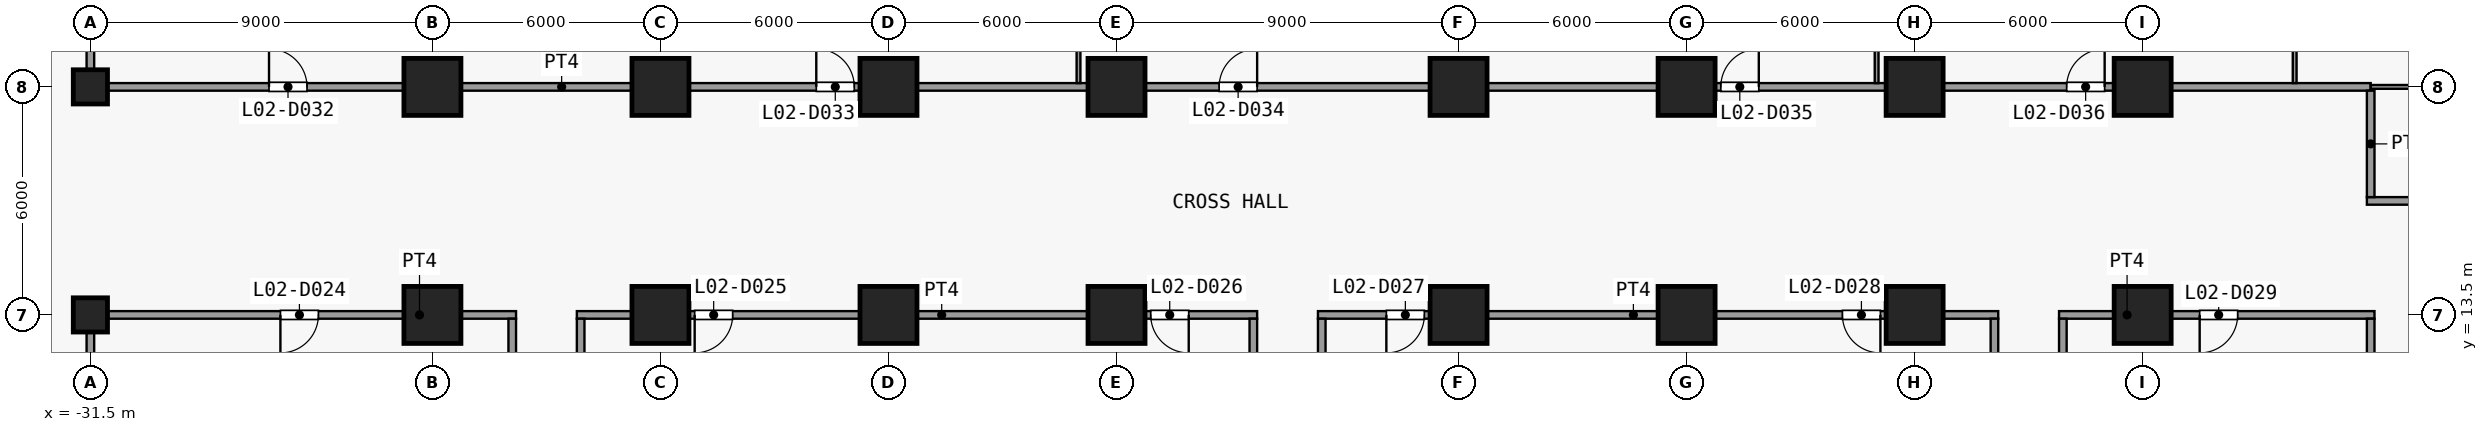
"""IFC4 building model, lengths in metres.
Left out: names, types, materials, properties, quantities, classifications, styles, units other than length and angle.
Written with IfcOpenShell. Run it as: python <this file> out.ifc"""

import sys

from ifc_helpers import new_model, si_unit, direction, frame, frame_2d, origin, origin_2d, place, context, subcontext, project, spatial, rectangle, extrude, element, fill, save


model = new_model("IFC4")
c1 = context("Model", 3, precision=1e-05, world=origin(), true_north=direction((0.0, 1.0)))
c2 = subcontext(c1, "Body", "Model", "MODEL_VIEW")
j1 = project(units=[si_unit("LENGTHUNIT", "METRE"), si_unit("PLANEANGLEUNIT", "RADIAN")], contexts=[c1])
p1 = place(None, origin())
s1 = spatial("IfcSite", under=j1, at=p1, CompositionType="ELEMENT")
p2 = place(p1, origin())
s2 = spatial("IfcBuilding", under=s1, at=p2, CompositionType="ELEMENT")
p3 = place(p2, frame((0.0, 0.0, 13.5)))
s3 = spatial("IfcBuildingStorey", under=s2, at=p3, CompositionType="ELEMENT", Elevation=13.5)
for number, where, z_axis, x_axis in (
    (1, (-31.5, 13.5, 0.0), (0.0, 0.0, 1.0), (1.0, 0.0, 0.0)),
    (2, (-31.5, 19.5, 0.0), (0.0, 0.0, 1.0), (1.0, 0.0, 0.0)),
):
    element("IfcColumn", number, at=place(p3, frame(where, z_axis=z_axis, x_axis=x_axis)), inside=s3, PredefinedType="COLUMN", context=c2, shape_type="SweptSolid", body=[
        extrude(rectangle(XDim=0.9, YDim=0.9, at=origin_2d()), origin(), (0.0, 0.0, 1.0), 5.0),
    ])
for number, where, z_axis, x_axis in (
    (3, (-22.5, 13.5, 0.0), (0.0, 0.0, 1.0), (1.0, 0.0, 0.0)),
    (4, (-22.5, 19.5, 0.0), (0.0, 0.0, 1.0), (1.0, 0.0, 0.0)),
    (5, (-16.5, 13.5, 0.0), (0.0, 0.0, 1.0), (1.0, 0.0, 0.0)),
    (6, (-16.5, 19.5, 0.0), (0.0, 0.0, 1.0), (1.0, 0.0, 0.0)),
    (7, (-10.5, 13.5, 0.0), (0.0, 0.0, 1.0), (1.0, 0.0, 0.0)),
    (8, (-10.5, 19.5, 0.0), (0.0, 0.0, 1.0), (1.0, 0.0, 0.0)),
    (9, (-4.5, 13.5, 0.0), (0.0, 0.0, 1.0), (1.0, 0.0, 0.0)),
    (10, (-4.5, 19.5, 0.0), (0.0, 0.0, 1.0), (1.0, 0.0, 0.0)),
    (11, (4.5, 13.5, 0.0), (0.0, 0.0, 1.0), (1.0, 0.0, 0.0)),
    (12, (4.5, 19.5, 0.0), (0.0, 0.0, 1.0), (1.0, 0.0, 0.0)),
    (13, (10.5, 13.5, 0.0), (0.0, 0.0, 1.0), (1.0, 0.0, 0.0)),
    (14, (10.5, 19.5, 0.0), (0.0, 0.0, 1.0), (1.0, 0.0, 0.0)),
    (15, (16.5, 13.5, 0.0), (0.0, 0.0, 1.0), (1.0, 0.0, 0.0)),
    (16, (16.5, 19.5, 0.0), (0.0, 0.0, 1.0), (1.0, 0.0, 0.0)),
    (17, (22.5, 13.5, 0.0), (0.0, 0.0, 1.0), (1.0, 0.0, 0.0)),
    (18, (22.5, 19.5, 0.0), (0.0, 0.0, 1.0), (1.0, 0.0, 0.0)),
):
    element("IfcColumn", number, at=place(p3, frame(where, z_axis=z_axis, x_axis=x_axis)), inside=s3, PredefinedType="COLUMN", context=c2, shape_type="SweptSolid", body=[
        extrude(rectangle(XDim=1.5, YDim=1.5, at=origin_2d()), origin(), (0.0, 0.0, 1.0), 5.0),
    ])
p4 = place(p3, frame((-31.6, 13.5, 0.0), z_axis=(0.0, 0.0, 1.0), x_axis=(1.0, 0.0, 0.0)))
e19 = element("IfcWall", 19, at=p4, inside=s3, PredefinedType="PARTITIONING", context=c2, shape_type="SweptSolid", body=[
    extrude(rectangle(XDim=11.3, YDim=0.2, at=frame_2d((5.65, 0.0))), origin(), (0.0, 0.0, 1.0), 4.65),
])
p5 = place(p4, frame((5.1, 0.0, 0.0)))
e20 = element("IfcOpeningElement", 20, at=p5, cuts=e19, PredefinedType="OPENING", context=c2, shape_type="SweptSolid", body=[
    extrude(rectangle(XDim=1.0, YDim=2.1, at=frame_2d((0.5, 1.05))), frame((0.0, 0.11, 0.0), z_axis=(0.0, -1.0, 0.0), x_axis=(1.0, 0.0, 0.0)), (0.0, 0.0, 1.0), 0.22),
])
p6 = place(p3, frame((-18.7, 13.5, 0.0), z_axis=(0.0, 0.0, 1.0), x_axis=(1.0, 0.0, 0.0)))
e21 = element("IfcWall", 21, at=p6, inside=s3, PredefinedType="PARTITIONING", context=c2, shape_type="SweptSolid", body=[
    extrude(rectangle(XDim=17.9, YDim=0.2, at=frame_2d((8.95, 0.0))), origin(), (0.0, 0.0, 1.0), 4.65),
])
p7 = place(p6, frame((3.1, 0.0, 0.0)))
e22 = element("IfcOpeningElement", 22, at=p7, cuts=e21, PredefinedType="OPENING", context=c2, shape_type="SweptSolid", body=[
    extrude(rectangle(XDim=1.0, YDim=2.1, at=frame_2d((0.5, 1.05))), frame((0.0, 0.11, 0.0), z_axis=(0.0, -1.0, 0.0), x_axis=(1.0, 0.0, 0.0)), (0.0, 0.0, 1.0), 0.22),
])
p8 = place(p6, frame((15.1, 0.0, 0.0)))
e23 = element("IfcOpeningElement", 23, at=p8, cuts=e21, PredefinedType="OPENING", context=c2, shape_type="SweptSolid", body=[
    extrude(rectangle(XDim=1.0, YDim=2.1, at=frame_2d((0.5, 1.05))), frame((0.0, 0.11, 0.0), z_axis=(0.0, -1.0, 0.0), x_axis=(1.0, 0.0, 0.0)), (0.0, 0.0, 1.0), 0.22),
])
p9 = place(p3, frame((0.8, 13.5, 0.0), z_axis=(0.0, 0.0, 1.0), x_axis=(1.0, 0.0, 0.0)))
e24 = element("IfcWall", 24, at=p9, inside=s3, PredefinedType="PARTITIONING", context=c2, shape_type="SweptSolid", body=[
    extrude(rectangle(XDim=17.9, YDim=0.2, at=frame_2d((8.95, 0.0))), origin(), (0.0, 0.0, 1.0), 4.65),
])
p10 = place(p9, frame((1.8, 0.0, 0.0)))
e25 = element("IfcOpeningElement", 25, at=p10, cuts=e24, PredefinedType="OPENING", context=c2, shape_type="SweptSolid", body=[
    extrude(rectangle(XDim=1.0, YDim=2.1, at=frame_2d((0.5, 1.05))), frame((0.0, 0.11, 0.0), z_axis=(0.0, -1.0, 0.0), x_axis=(1.0, 0.0, 0.0)), (0.0, 0.0, 1.0), 0.22),
])
p11 = place(p9, frame((13.8, 0.0, 0.0)))
e26 = element("IfcOpeningElement", 26, at=p11, cuts=e24, PredefinedType="OPENING", context=c2, shape_type="SweptSolid", body=[
    extrude(rectangle(XDim=1.0, YDim=2.1, at=frame_2d((0.5, 1.05))), frame((0.0, 0.11, 0.0), z_axis=(0.0, -1.0, 0.0), x_axis=(1.0, 0.0, 0.0)), (0.0, 0.0, 1.0), 0.22),
])
p12 = place(p3, frame((20.3, 13.5, 0.0), z_axis=(0.0, 0.0, 1.0), x_axis=(1.0, 0.0, 0.0)))
e27 = element("IfcWall", 27, at=p12, inside=s3, PredefinedType="PARTITIONING", context=c2, shape_type="SweptSolid", body=[
    extrude(rectangle(XDim=8.3, YDim=0.2, at=frame_2d((4.15, 0.0))), origin(), (0.0, 0.0, 1.0), 4.65),
])
p13 = place(p12, frame((3.7, 0.0, 0.0)))
e28 = element("IfcOpeningElement", 28, at=p13, cuts=e27, PredefinedType="OPENING", context=c2, shape_type="SweptSolid", body=[
    extrude(rectangle(XDim=1.0, YDim=2.1, at=frame_2d((0.5, 1.05))), frame((0.0, 0.11, 0.0), z_axis=(0.0, -1.0, 0.0), x_axis=(1.0, 0.0, 0.0)), (0.0, 0.0, 1.0), 0.22),
])
p14 = place(p3, frame((28.4, 16.5, 0.0), z_axis=(0.0, 0.0, 1.0), x_axis=(1.0, 0.0, 0.0)))
e29 = element("IfcWall", 29, at=p14, inside=s3, PredefinedType="PARTITIONING", context=c2, shape_type="SweptSolid", body=[
    extrude(rectangle(XDim=24.2, YDim=0.2, at=frame_2d((12.1, 0.0))), origin(), (0.0, 0.0, 1.0), 4.65),
])
p15 = place(p14, frame((6.2, 0.0, 0.0)))
e30 = element("IfcOpeningElement", 30, at=p15, cuts=e29, PredefinedType="OPENING", context=c2, shape_type="SweptSolid", body=[
    extrude(rectangle(XDim=1.0, YDim=2.1, at=frame_2d((0.5, 1.05))), frame((0.0, 0.11, 0.0), z_axis=(0.0, -1.0, 0.0), x_axis=(1.0, 0.0, 0.0)), (0.0, 0.0, 1.0), 0.22),
])
p16 = place(p14, frame((17.0, 0.0, 0.0)))
e31 = element("IfcOpeningElement", 31, at=p16, cuts=e29, PredefinedType="OPENING", context=c2, shape_type="SweptSolid", body=[
    extrude(rectangle(XDim=1.0, YDim=2.1, at=frame_2d((0.5, 1.05))), frame((0.0, 0.11, 0.0), z_axis=(0.0, -1.0, 0.0), x_axis=(1.0, 0.0, 0.0)), (0.0, 0.0, 1.0), 0.22),
])
p17 = place(p3, frame((-31.6, 19.5, 0.0), z_axis=(0.0, 0.0, 1.0), x_axis=(1.0, 0.0, 0.0)))
e32 = element("IfcWall", 32, at=p17, inside=s3, PredefinedType="PARTITIONING", context=c2, shape_type="SweptSolid", body=[
    extrude(rectangle(XDim=60.1, YDim=0.2, at=frame_2d((30.05, 0.0))), origin(), (0.0, 0.0, 1.0), 4.65),
])
p18 = place(p17, frame((4.8, 0.0, 0.0)))
e33 = element("IfcOpeningElement", 33, at=p18, cuts=e32, PredefinedType="OPENING", context=c2, shape_type="SweptSolid", body=[
    extrude(rectangle(XDim=1.0, YDim=2.1, at=frame_2d((0.5, 1.05))), frame((0.0, 0.11, 0.0), z_axis=(0.0, -1.0, 0.0), x_axis=(1.0, 0.0, 0.0)), (0.0, 0.0, 1.0), 0.22),
])
p19 = place(p17, frame((19.2, 0.0, 0.0)))
e34 = element("IfcOpeningElement", 34, at=p19, cuts=e32, PredefinedType="OPENING", context=c2, shape_type="SweptSolid", body=[
    extrude(rectangle(XDim=1.0, YDim=2.1, at=frame_2d((0.5, 1.05))), frame((0.0, 0.11, 0.0), z_axis=(0.0, -1.0, 0.0), x_axis=(1.0, 0.0, 0.0)), (0.0, 0.0, 1.0), 0.22),
])
p20 = place(p17, frame((29.8, 0.0, 0.0)))
e35 = element("IfcOpeningElement", 35, at=p20, cuts=e32, PredefinedType="OPENING", context=c2, shape_type="SweptSolid", body=[
    extrude(rectangle(XDim=1.0, YDim=2.1, at=frame_2d((0.5, 1.05))), frame((0.0, 0.11, 0.0), z_axis=(0.0, -1.0, 0.0), x_axis=(1.0, 0.0, 0.0)), (0.0, 0.0, 1.0), 0.22),
])
p21 = place(p17, frame((43.0, 0.0, 0.0)))
e36 = element("IfcOpeningElement", 36, at=p21, cuts=e32, PredefinedType="OPENING", context=c2, shape_type="SweptSolid", body=[
    extrude(rectangle(XDim=1.0, YDim=2.1, at=frame_2d((0.5, 1.05))), frame((0.0, 0.11, 0.0), z_axis=(0.0, -1.0, 0.0), x_axis=(1.0, 0.0, 0.0)), (0.0, 0.0, 1.0), 0.22),
])
p22 = place(p17, frame((52.1, 0.0, 0.0)))
e37 = element("IfcOpeningElement", 37, at=p22, cuts=e32, PredefinedType="OPENING", context=c2, shape_type="SweptSolid", body=[
    extrude(rectangle(XDim=1.0, YDim=2.1, at=frame_2d((0.5, 1.05))), frame((0.0, 0.11, 0.0), z_axis=(0.0, -1.0, 0.0), x_axis=(1.0, 0.0, 0.0)), (0.0, 0.0, 1.0), 0.22),
])
p23 = place(p3, frame((28.5, 19.5, 0.0), z_axis=(0.0, 0.0, 1.0), x_axis=(1.0, 0.0, 0.0)))
e38 = element("IfcWall", 38, at=p23, inside=s3, PredefinedType="PARTITIONING", context=c2, shape_type="SweptSolid", body=[
    extrude(rectangle(XDim=23.9, YDim=0.1, at=frame_2d((11.95, 0.0))), origin(), (0.0, 0.0, 1.0), 4.65),
])
p24 = place(p3, frame((-31.5, 1.6, 0.0), z_axis=(0.0, 0.0, 1.0), x_axis=(0.0, 1.0, 0.0)))
e39 = element("IfcWall", 39, at=p24, inside=s3, PredefinedType="PARTITIONING", context=c2, shape_type="SweptSolid", body=[
    extrude(rectangle(XDim=11.8, YDim=0.2, at=frame_2d((5.9, 0.0))), origin(), (0.0, 0.0, 1.0), 4.65),
])
p25 = place(p3, frame((-31.5, 19.6, 0.0), z_axis=(0.0, 0.0, 1.0), x_axis=(0.0, 1.0, 0.0)))
e40 = element("IfcWall", 40, at=p25, inside=s3, PredefinedType="PARTITIONING", context=c2, shape_type="SweptSolid", body=[
    extrude(rectangle(XDim=11.8, YDim=0.2, at=frame_2d((5.9, 0.0))), origin(), (0.0, 0.0, 1.0), 4.65),
])
p26 = place(p25, frame((8.3, 0.0, 0.0)))
e41 = element("IfcOpeningElement", 41, at=p26, cuts=e40, PredefinedType="OPENING", context=c2, shape_type="SweptSolid", body=[
    extrude(rectangle(XDim=1.0, YDim=2.1, at=frame_2d((0.5, 1.05))), frame((0.0, 0.11, 0.0), z_axis=(0.0, -1.0, 0.0), x_axis=(1.0, 0.0, 0.0)), (0.0, 0.0, 1.0), 0.22),
])
for number, where, z_axis, x_axis in (
    (42, (-20.4, 1.6, 0.0), (0.0, 0.0, 1.0), (0.0, 1.0, 0.0)),
    (43, (-18.6, 1.6, 0.0), (0.0, 0.0, 1.0), (0.0, 1.0, 0.0)),
):
    element("IfcWall", number, at=place(p3, frame(where, z_axis=z_axis, x_axis=x_axis)), inside=s3, PredefinedType="PARTITIONING", context=c2, shape_type="SweptSolid", body=[
        extrude(rectangle(XDim=11.8, YDim=0.2, at=frame_2d((5.9, 0.0))), origin(), (0.0, 0.0, 1.0), 4.65),
    ])
p27 = place(p3, frame((-5.5, 19.6, 0.0), z_axis=(0.0, 0.0, 1.0), x_axis=(0.0, 1.0, 0.0)))
e44 = element("IfcWall", 44, at=p27, inside=s3, PredefinedType="PARTITIONING", context=c2, shape_type="SweptSolid", body=[
    extrude(rectangle(XDim=5.85, YDim=0.1, at=frame_2d((2.925, 0.0))), origin(), (0.0, 0.0, 1.0), 4.65),
])
for number, where, z_axis, x_axis in (
    (45, (-0.9, 1.6, 0.0), (0.0, 0.0, 1.0), (0.0, 1.0, 0.0)),
    (46, (0.9, 1.6, 0.0), (0.0, 0.0, 1.0), (0.0, 1.0, 0.0)),
):
    element("IfcWall", number, at=place(p3, frame(where, z_axis=z_axis, x_axis=x_axis)), inside=s3, PredefinedType="PARTITIONING", context=c2, shape_type="SweptSolid", body=[
        extrude(rectangle(XDim=11.8, YDim=0.2, at=frame_2d((5.9, 0.0))), origin(), (0.0, 0.0, 1.0), 4.65),
    ])
p28 = place(p3, frame((15.5, 19.6, 0.0), z_axis=(0.0, 0.0, 1.0), x_axis=(0.0, 1.0, 0.0)))
e47 = element("IfcWall", 47, at=p28, inside=s3, PredefinedType="PARTITIONING", context=c2, shape_type="SweptSolid", body=[
    extrude(rectangle(XDim=5.85, YDim=0.1, at=frame_2d((2.925, 0.0))), origin(), (0.0, 0.0, 1.0), 4.65),
])
for number, where, z_axis, x_axis in (
    (48, (18.6, 1.6, 0.0), (0.0, 0.0, 1.0), (0.0, 1.0, 0.0)),
    (49, (20.4, 1.6, 0.0), (0.0, 0.0, 1.0), (0.0, 1.0, 0.0)),
):
    element("IfcWall", number, at=place(p3, frame(where, z_axis=z_axis, x_axis=x_axis)), inside=s3, PredefinedType="PARTITIONING", context=c2, shape_type="SweptSolid", body=[
        extrude(rectangle(XDim=11.8, YDim=0.2, at=frame_2d((5.9, 0.0))), origin(), (0.0, 0.0, 1.0), 4.65),
    ])
p29 = place(p3, frame((26.5, 19.6, 0.0), z_axis=(0.0, 0.0, 1.0), x_axis=(0.0, 1.0, 0.0)))
e50 = element("IfcWall", 50, at=p29, inside=s3, PredefinedType="PARTITIONING", context=c2, shape_type="SweptSolid", body=[
    extrude(rectangle(XDim=5.85, YDim=0.1, at=frame_2d((2.925, 0.0))), origin(), (0.0, 0.0, 1.0), 4.65),
])
p30 = place(p3, frame((28.5, 1.6, 0.0), z_axis=(0.0, 0.0, 1.0), x_axis=(0.0, 1.0, 0.0)))
e51 = element("IfcWall", 51, at=p30, inside=s3, PredefinedType="PARTITIONING", context=c2, shape_type="SweptSolid", body=[
    extrude(rectangle(XDim=11.8, YDim=0.2, at=frame_2d((5.9, 0.0))), origin(), (0.0, 0.0, 1.0), 4.65),
])
p31 = place(p3, frame((28.5, 16.6, 0.0), z_axis=(0.0, 0.0, 1.0), x_axis=(0.0, 1.0, 0.0)))
e52 = element("IfcWall", 52, at=p31, inside=s3, PredefinedType="PARTITIONING", context=c2, shape_type="SweptSolid", body=[
    extrude(rectangle(XDim=2.8, YDim=0.2, at=frame_2d((1.4, 0.0))), origin(), (0.0, 0.0, 1.0), 4.65),
])
p32 = place(p5, origin())
e53 = element("IfcDoor", 53, at=p32, inside=s3, OperationType="SINGLE_SWING_LEFT", PredefinedType="DOOR", context=c2, shape_type="SweptSolid", body=[
    extrude(rectangle(XDim=1.0, YDim=2.1, at=frame_2d((0.5, 1.05))), frame((0.0, 0.025, 0.0), z_axis=(0.0, -1.0, 0.0), x_axis=(1.0, 0.0, 0.0)), (0.0, 0.0, 1.0), 0.05),
])
fill(e20, e53)
p33 = place(p7, origin())
e54 = element("IfcDoor", 54, at=p33, inside=s3, OperationType="SINGLE_SWING_LEFT", PredefinedType="DOOR", context=c2, shape_type="SweptSolid", body=[
    extrude(rectangle(XDim=1.0, YDim=2.1, at=frame_2d((0.5, 1.05))), frame((0.0, 0.025, 0.0), z_axis=(0.0, -1.0, 0.0), x_axis=(1.0, 0.0, 0.0)), (0.0, 0.0, 1.0), 0.05),
])
fill(e22, e54)
p34 = place(p8, origin())
e55 = element("IfcDoor", 55, at=p34, inside=s3, OperationType="SINGLE_SWING_RIGHT", PredefinedType="DOOR", context=c2, shape_type="SweptSolid", body=[
    extrude(rectangle(XDim=1.0, YDim=2.1, at=frame_2d((0.5, 1.05))), frame((0.0, 0.025, 0.0), z_axis=(0.0, -1.0, 0.0), x_axis=(1.0, 0.0, 0.0)), (0.0, 0.0, 1.0), 0.05),
])
fill(e23, e55)
p35 = place(p10, origin())
e56 = element("IfcDoor", 56, at=p35, inside=s3, OperationType="SINGLE_SWING_LEFT", PredefinedType="DOOR", context=c2, shape_type="SweptSolid", body=[
    extrude(rectangle(XDim=1.0, YDim=2.1, at=frame_2d((0.5, 1.05))), frame((0.0, 0.025, 0.0), z_axis=(0.0, -1.0, 0.0), x_axis=(1.0, 0.0, 0.0)), (0.0, 0.0, 1.0), 0.05),
])
fill(e25, e56)
p36 = place(p11, origin())
e57 = element("IfcDoor", 57, at=p36, inside=s3, OperationType="SINGLE_SWING_RIGHT", PredefinedType="DOOR", context=c2, shape_type="SweptSolid", body=[
    extrude(rectangle(XDim=1.0, YDim=2.1, at=frame_2d((0.5, 1.05))), frame((0.0, 0.025, 0.0), z_axis=(0.0, -1.0, 0.0), x_axis=(1.0, 0.0, 0.0)), (0.0, 0.0, 1.0), 0.05),
])
fill(e26, e57)
p37 = place(p13, origin())
e58 = element("IfcDoor", 58, at=p37, inside=s3, OperationType="SINGLE_SWING_LEFT", PredefinedType="DOOR", context=c2, shape_type="SweptSolid", body=[
    extrude(rectangle(XDim=1.0, YDim=2.1, at=frame_2d((0.5, 1.05))), frame((0.0, 0.025, 0.0), z_axis=(0.0, -1.0, 0.0), x_axis=(1.0, 0.0, 0.0)), (0.0, 0.0, 1.0), 0.05),
])
fill(e28, e58)
p38 = place(p18, origin())
e59 = element("IfcDoor", 59, at=p38, inside=s3, OperationType="SINGLE_SWING_RIGHT", PredefinedType="DOOR", context=c2, shape_type="SweptSolid", body=[
    extrude(rectangle(XDim=1.0, YDim=2.1, at=frame_2d((0.5, 1.05))), frame((0.0, 0.025, 0.0), z_axis=(0.0, -1.0, 0.0), x_axis=(1.0, 0.0, 0.0)), (0.0, 0.0, 1.0), 0.05),
])
fill(e33, e59)
p39 = place(p19, origin())
e60 = element("IfcDoor", 60, at=p39, inside=s3, OperationType="SINGLE_SWING_RIGHT", PredefinedType="DOOR", context=c2, shape_type="SweptSolid", body=[
    extrude(rectangle(XDim=1.0, YDim=2.1, at=frame_2d((0.5, 1.05))), frame((0.0, 0.025, 0.0), z_axis=(0.0, -1.0, 0.0), x_axis=(1.0, 0.0, 0.0)), (0.0, 0.0, 1.0), 0.05),
])
fill(e34, e60)
p40 = place(p20, origin())
e61 = element("IfcDoor", 61, at=p40, inside=s3, OperationType="SINGLE_SWING_LEFT", PredefinedType="DOOR", context=c2, shape_type="SweptSolid", body=[
    extrude(rectangle(XDim=1.0, YDim=2.1, at=frame_2d((0.5, 1.05))), frame((0.0, 0.025, 0.0), z_axis=(0.0, -1.0, 0.0), x_axis=(1.0, 0.0, 0.0)), (0.0, 0.0, 1.0), 0.05),
])
fill(e35, e61)
p41 = place(p21, origin())
e62 = element("IfcDoor", 62, at=p41, inside=s3, OperationType="SINGLE_SWING_LEFT", PredefinedType="DOOR", context=c2, shape_type="SweptSolid", body=[
    extrude(rectangle(XDim=1.0, YDim=2.1, at=frame_2d((0.5, 1.05))), frame((0.0, 0.025, 0.0), z_axis=(0.0, -1.0, 0.0), x_axis=(1.0, 0.0, 0.0)), (0.0, 0.0, 1.0), 0.05),
])
fill(e36, e62)
p42 = place(p22, origin())
e63 = element("IfcDoor", 63, at=p42, inside=s3, OperationType="SINGLE_SWING_LEFT", PredefinedType="DOOR", context=c2, shape_type="SweptSolid", body=[
    extrude(rectangle(XDim=1.0, YDim=2.1, at=frame_2d((0.5, 1.05))), frame((0.0, 0.025, 0.0), z_axis=(0.0, -1.0, 0.0), x_axis=(1.0, 0.0, 0.0)), (0.0, 0.0, 1.0), 0.05),
])
fill(e37, e63)
save(model, sys.argv[1])
